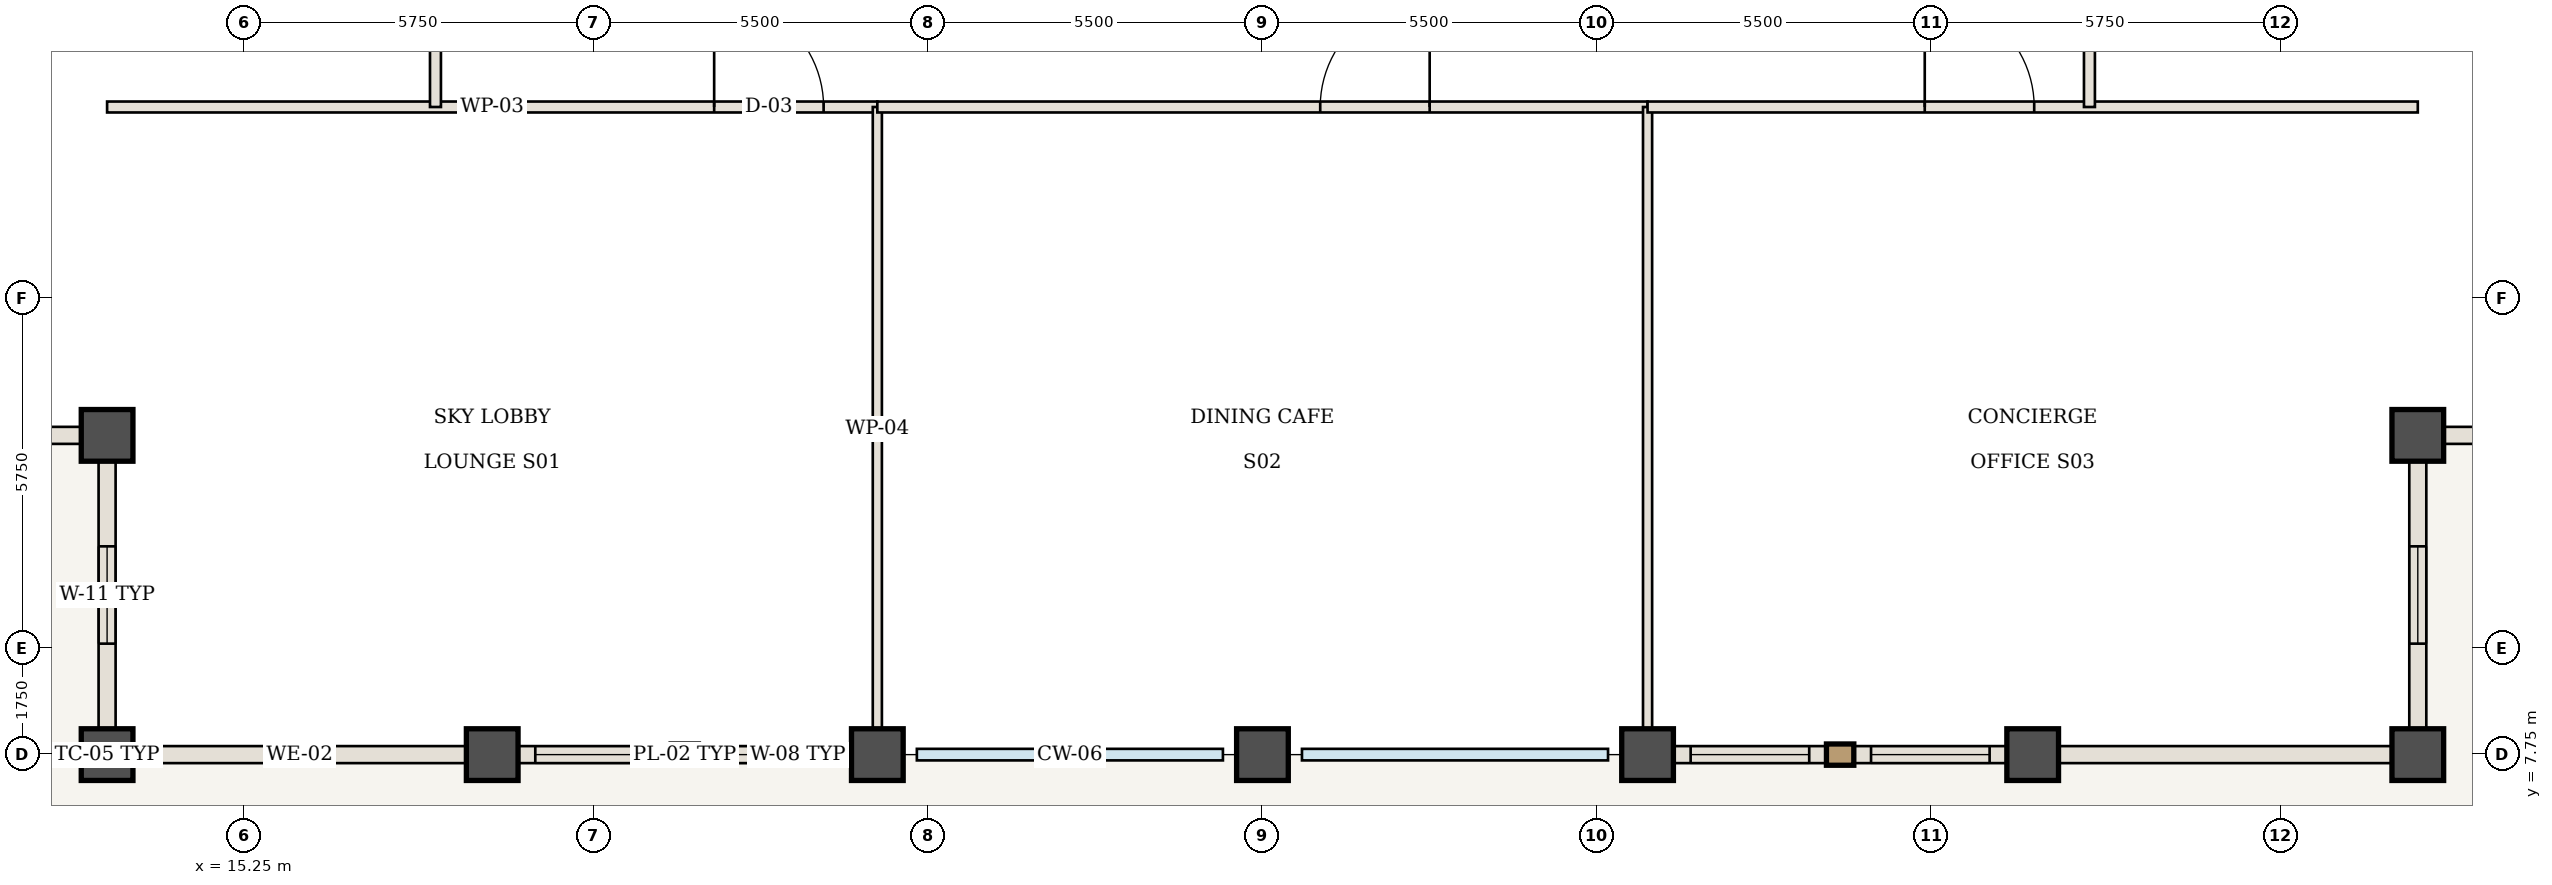
"""IFC4 building model, lengths in metres.
Left out: names, types, materials, properties, quantities, classifications, styles, units other than length and angle.
Written with IfcOpenShell. Run it as: python <this file> out.ifc"""

import sys

from ifc_helpers import new_model, si_unit, direction, frame, frame_2d, origin, origin_2d, place, context, subcontext, project, spatial, rectangle, extrude, element, fill, save


model = new_model("IFC4")
c1 = context("Model", 3, precision=1e-05, world=origin(), true_north=direction((0.0, 1.0)))
c2 = subcontext(c1, "Body", "Model", "MODEL_VIEW")
j1 = project(units=[si_unit("LENGTHUNIT", "METRE"), si_unit("PLANEANGLEUNIT", "RADIAN")], contexts=[c1])
p1 = place(None, origin())
s1 = spatial("IfcSite", under=j1, at=p1, CompositionType="ELEMENT")
p2 = place(p1, origin())
s2 = spatial("IfcBuilding", under=s1, at=p2, CompositionType="ELEMENT")
p3 = place(p2, frame((0.0, 0.0, 182.35)))
s3 = spatial("IfcBuildingStorey", under=s2, at=p3, CompositionType="ELEMENT", Elevation=182.35)
for number, where, z_axis, x_axis in (
    (1, (13.0, 7.75, -0.42), (0.0, 0.0, 1.0), (1.0, 0.0, 0.0)),
    (2, (13.0, 13.0, -0.42), (0.0, 0.0, 1.0), (1.0, 0.0, 0.0)),
    (3, (51.0, 7.75, -0.42), (0.0, 0.0, 1.0), (1.0, 0.0, 0.0)),
    (4, (51.0, 13.0, -0.42), (0.0, 0.0, 1.0), (1.0, 0.0, 0.0)),
    (5, (19.333, 7.75, -0.42), (0.0, 0.0, 1.0), (1.0, 0.0, 0.0)),
    (6, (25.667, 7.75, -0.42), (0.0, 0.0, 1.0), (1.0, 0.0, 0.0)),
    (7, (32.0, 7.75, -0.42), (0.0, 0.0, 1.0), (1.0, 0.0, 0.0)),
    (8, (38.333, 7.75, -0.42), (0.0, 0.0, 1.0), (1.0, 0.0, 0.0)),
    (9, (44.667, 7.75, -0.42), (0.0, 0.0, 1.0), (1.0, 0.0, 0.0)),
):
    element("IfcColumn", number, at=place(p3, frame(where, z_axis=z_axis, x_axis=x_axis)), inside=s3, PredefinedType="COLUMN", context=c2, shape_type="SweptSolid", body=[
        extrude(rectangle(XDim=0.85, YDim=0.85, at=origin_2d()), origin(), (0.0, 0.0, 1.0), 4.97),
    ])
p4 = place(p3, frame((13.0, 18.4, 0.0), z_axis=(0.0, 0.0, 1.0), x_axis=(1.0, 0.0, 0.0)))
e10 = element("IfcWall", 10, at=p4, inside=s3, PredefinedType="STANDARD", context=c2, shape_type="SweptSolid", body=[
    extrude(rectangle(XDim=12.667, YDim=0.18, at=frame_2d((6.333, 0.0))), origin(), (0.0, 0.0, 1.0), 4.13),
])
p5 = place(p4, frame((9.983, 0.0, 0.0)))
e11 = element("IfcOpeningElement", 11, at=p5, cuts=e10, PredefinedType="OPENING", context=c2, shape_type="SweptSolid", body=[
    extrude(rectangle(XDim=1.8, YDim=2.35, at=frame_2d((0.9, 1.175))), frame((0.0, 0.1, 0.0), z_axis=(0.0, -1.0, 0.0), x_axis=(1.0, 0.0, 0.0)), (0.0, 0.0, 1.0), 0.2),
])
p6 = place(p3, frame((25.667, 7.81, 0.0), z_axis=(0.0, 0.0, 1.0), x_axis=(0.0, 1.0, 0.0)))
e12 = element("IfcWall", 12, at=p6, inside=s3, PredefinedType="STANDARD", context=c2, shape_type="SweptSolid", body=[
    extrude(rectangle(XDim=10.59, YDim=0.15, at=frame_2d((5.295, 0.0))), origin(), (0.0, 0.0, 1.0), 4.13),
])
p7 = place(p3, frame((25.667, 18.4, 0.0), z_axis=(0.0, 0.0, 1.0), x_axis=(1.0, 0.0, 0.0)))
e13 = element("IfcWall", 13, at=p7, inside=s3, PredefinedType="STANDARD", context=c2, shape_type="SweptSolid", body=[
    extrude(rectangle(XDim=12.667, YDim=0.18, at=frame_2d((6.333, 0.0))), origin(), (0.0, 0.0, 1.0), 4.13),
])
p8 = place(p7, frame((7.283, 0.0, 0.0)))
e14 = element("IfcOpeningElement", 14, at=p8, cuts=e13, PredefinedType="OPENING", context=c2, shape_type="SweptSolid", body=[
    extrude(rectangle(XDim=1.8, YDim=2.35, at=frame_2d((0.9, 1.175))), frame((0.0, 0.1, 0.0), z_axis=(0.0, -1.0, 0.0), x_axis=(1.0, 0.0, 0.0)), (0.0, 0.0, 1.0), 0.2),
])
p9 = place(p3, frame((38.333, 7.81, 0.0), z_axis=(0.0, 0.0, 1.0), x_axis=(0.0, 1.0, 0.0)))
e15 = element("IfcWall", 15, at=p9, inside=s3, PredefinedType="STANDARD", context=c2, shape_type="SweptSolid", body=[
    extrude(rectangle(XDim=10.59, YDim=0.15, at=frame_2d((5.295, 0.0))), origin(), (0.0, 0.0, 1.0), 4.13),
])
p10 = place(p3, frame((38.333, 18.4, 0.0), z_axis=(0.0, 0.0, 1.0), x_axis=(1.0, 0.0, 0.0)))
e16 = element("IfcWall", 16, at=p10, inside=s3, PredefinedType="STANDARD", context=c2, shape_type="SweptSolid", body=[
    extrude(rectangle(XDim=12.667, YDim=0.18, at=frame_2d((6.333, 0.0))), origin(), (0.0, 0.0, 1.0), 4.13),
])
p11 = place(p10, frame((4.558, 0.0, 0.0)))
e17 = element("IfcOpeningElement", 17, at=p11, cuts=e16, PredefinedType="OPENING", context=c2, shape_type="SweptSolid", body=[
    extrude(rectangle(XDim=1.8, YDim=2.35, at=frame_2d((0.9, 1.175))), frame((0.0, 0.1, 0.0), z_axis=(0.0, -1.0, 0.0), x_axis=(1.0, 0.0, 0.0)), (0.0, 0.0, 1.0), 0.2),
])
p12 = place(p3, frame((18.4, 18.4, 0.0), z_axis=(0.0, 0.0, 1.0), x_axis=(0.0, 1.0, 0.0)))
e18 = element("IfcWall", 18, at=p12, inside=s3, PredefinedType="STANDARD", context=c2, shape_type="SweptSolid", body=[
    extrude(rectangle(XDim=19.933, YDim=0.18, at=frame_2d((9.967, 0.0))), origin(), (0.0, 0.0, 1.0), 4.13),
])
p13 = place(p12, frame((9.467, 0.0, 0.0)))
e19 = element("IfcOpeningElement", 19, at=p13, cuts=e18, PredefinedType="OPENING", context=c2, shape_type="SweptSolid", body=[
    extrude(rectangle(XDim=1.8, YDim=2.35, at=frame_2d((0.9, 1.175))), frame((0.0, 0.1, 0.0), z_axis=(0.0, -1.0, 0.0), x_axis=(1.0, 0.0, 0.0)), (0.0, 0.0, 1.0), 0.2),
])
p14 = place(p3, frame((45.6, 18.4, 0.0), z_axis=(0.0, 0.0, 1.0), x_axis=(0.0, 1.0, 0.0)))
e20 = element("IfcWall", 20, at=p14, inside=s3, PredefinedType="STANDARD", context=c2, shape_type="SweptSolid", body=[
    extrude(rectangle(XDim=13.4, YDim=0.18, at=frame_2d((6.7, 0.0))), origin(), (0.0, 0.0, 1.0), 4.13),
])
p15 = place(p14, frame((6.2, 0.0, 0.0)))
e21 = element("IfcOpeningElement", 21, at=p15, cuts=e20, PredefinedType="OPENING", context=c2, shape_type="SweptSolid", body=[
    extrude(rectangle(XDim=0.98, YDim=2.2, at=frame_2d((0.49, 1.1))), frame((0.0, 0.1, 0.0), z_axis=(0.0, -1.0, 0.0), x_axis=(1.0, 0.0, 0.0)), (0.0, 0.0, 1.0), 0.2),
])
p16 = place(p3, frame((19.333, 7.75, 0.0), z_axis=(0.0, 0.0, 1.0), x_axis=(-1.0, 0.0, 0.0)))
e22 = element("IfcWall", 22, at=p16, inside=s3, PredefinedType="USERDEFINED", context=c2, shape_type="SweptSolid", body=[
    extrude(rectangle(XDim=6.333, YDim=0.28, at=frame_2d((3.167, 0.0))), origin(), (0.0, 0.0, 1.0), 3.43),
])
p17 = place(p3, frame((25.667, 7.75, 0.0), z_axis=(0.0, 0.0, 1.0), x_axis=(-1.0, 0.0, 0.0)))
e23 = element("IfcWall", 23, at=p17, inside=s3, PredefinedType="USERDEFINED", context=c2, shape_type="SweptSolid", body=[
    extrude(rectangle(XDim=6.333, YDim=0.28, at=frame_2d((3.167, 0.0))), origin(), (0.0, 0.0, 1.0), 3.43),
])
p18 = place(p17, frame((0.708, 0.0, 0.85)))
e24 = element("IfcOpeningElement", 24, at=p18, cuts=e23, PredefinedType="OPENING", context=c2, shape_type="SweptSolid", body=[
    extrude(rectangle(XDim=1.95, YDim=2.2, at=frame_2d((0.975, 1.1))), frame((0.0, 0.15, 0.0), z_axis=(0.0, -1.0, 0.0), x_axis=(1.0, 0.0, 0.0)), (0.0, 0.0, 1.0), 0.3),
])
p19 = place(p17, frame((3.675, 0.0, 0.85)))
e25 = element("IfcOpeningElement", 25, at=p19, cuts=e23, PredefinedType="OPENING", context=c2, shape_type="SweptSolid", body=[
    extrude(rectangle(XDim=1.95, YDim=2.2, at=frame_2d((0.975, 1.1))), frame((0.0, 0.15, 0.0), z_axis=(0.0, -1.0, 0.0), x_axis=(1.0, 0.0, 0.0)), (0.0, 0.0, 1.0), 0.3),
])
p20 = place(p3, frame((44.667, 7.75, 0.0), z_axis=(0.0, 0.0, 1.0), x_axis=(-1.0, 0.0, 0.0)))
e26 = element("IfcWall", 26, at=p20, inside=s3, PredefinedType="USERDEFINED", context=c2, shape_type="SweptSolid", body=[
    extrude(rectangle(XDim=6.333, YDim=0.28, at=frame_2d((3.167, 0.0))), origin(), (0.0, 0.0, 1.0), 3.43),
])
p21 = place(p20, frame((0.708, 0.0, 0.85)))
e27 = element("IfcOpeningElement", 27, at=p21, cuts=e26, PredefinedType="OPENING", context=c2, shape_type="SweptSolid", body=[
    extrude(rectangle(XDim=1.95, YDim=2.2, at=frame_2d((0.975, 1.1))), frame((0.0, 0.15, 0.0), z_axis=(0.0, -1.0, 0.0), x_axis=(1.0, 0.0, 0.0)), (0.0, 0.0, 1.0), 0.3),
])
p22 = place(p20, frame((3.675, 0.0, 0.85)))
e28 = element("IfcOpeningElement", 28, at=p22, cuts=e26, PredefinedType="OPENING", context=c2, shape_type="SweptSolid", body=[
    extrude(rectangle(XDim=1.95, YDim=2.2, at=frame_2d((0.975, 1.1))), frame((0.0, 0.15, 0.0), z_axis=(0.0, -1.0, 0.0), x_axis=(1.0, 0.0, 0.0)), (0.0, 0.0, 1.0), 0.3),
])
p23 = place(p3, frame((51.0, 7.75, 0.0), z_axis=(0.0, 0.0, 1.0), x_axis=(-1.0, 0.0, 0.0)))
e29 = element("IfcWall", 29, at=p23, inside=s3, PredefinedType="USERDEFINED", context=c2, shape_type="SweptSolid", body=[
    extrude(rectangle(XDim=6.333, YDim=0.28, at=frame_2d((3.167, 0.0))), origin(), (0.0, 0.0, 1.0), 3.43),
])
p24 = place(p3, frame((13.0, 7.75, 0.0), z_axis=(0.0, 0.0, 1.0), x_axis=(0.0, 1.0, 0.0)))
e30 = element("IfcWall", 30, at=p24, inside=s3, PredefinedType="USERDEFINED", context=c2, shape_type="SweptSolid", body=[
    extrude(rectangle(XDim=5.25, YDim=0.28, at=frame_2d((2.625, 0.0))), origin(), (0.0, 0.0, 1.0), 3.43),
])
p25 = place(p24, frame((1.825, 0.0, 0.85)))
e31 = element("IfcOpeningElement", 31, at=p25, cuts=e30, PredefinedType="OPENING", context=c2, shape_type="SweptSolid", body=[
    extrude(rectangle(XDim=1.6, YDim=2.05, at=frame_2d((0.8, 1.025))), frame((0.0, 0.15, 0.0), z_axis=(0.0, -1.0, 0.0), x_axis=(1.0, 0.0, 0.0)), (0.0, 0.0, 1.0), 0.3),
])
p26 = place(p3, frame((13.0, 13.0, 0.0), z_axis=(0.0, 0.0, 1.0), x_axis=(-1.0, 0.0, 0.0)))
e32 = element("IfcWall", 32, at=p26, inside=s3, PredefinedType="USERDEFINED", context=c2, shape_type="SweptSolid", body=[
    extrude(rectangle(XDim=5.25, YDim=0.28, at=frame_2d((2.625, 0.0))), origin(), (0.0, 0.0, 1.0), 3.43),
])
p27 = place(p26, frame((1.825, 0.0, 0.85)))
e33 = element("IfcOpeningElement", 33, at=p27, cuts=e32, PredefinedType="OPENING", context=c2, shape_type="SweptSolid", body=[
    extrude(rectangle(XDim=1.6, YDim=2.05, at=frame_2d((0.8, 1.025))), frame((0.0, 0.15, 0.0), z_axis=(0.0, -1.0, 0.0), x_axis=(1.0, 0.0, 0.0)), (0.0, 0.0, 1.0), 0.3),
])
p28 = place(p3, frame((51.0, 13.0, 0.0), z_axis=(0.0, 0.0, 1.0), x_axis=(0.0, -1.0, 0.0)))
e34 = element("IfcWall", 34, at=p28, inside=s3, PredefinedType="USERDEFINED", context=c2, shape_type="SweptSolid", body=[
    extrude(rectangle(XDim=5.25, YDim=0.28, at=frame_2d((2.625, 0.0))), origin(), (0.0, 0.0, 1.0), 3.43),
])
p29 = place(p28, frame((1.825, 0.0, 0.85)))
e35 = element("IfcOpeningElement", 35, at=p29, cuts=e34, PredefinedType="OPENING", context=c2, shape_type="SweptSolid", body=[
    extrude(rectangle(XDim=1.6, YDim=2.05, at=frame_2d((0.8, 1.025))), frame((0.0, 0.15, 0.0), z_axis=(0.0, -1.0, 0.0), x_axis=(1.0, 0.0, 0.0)), (0.0, 0.0, 1.0), 0.3),
])
p30 = place(p3, frame((56.25, 13.0, 0.0), z_axis=(0.0, 0.0, 1.0), x_axis=(-1.0, 0.0, 0.0)))
e36 = element("IfcWall", 36, at=p30, inside=s3, PredefinedType="USERDEFINED", context=c2, shape_type="SweptSolid", body=[
    extrude(rectangle(XDim=5.25, YDim=0.28, at=frame_2d((2.625, 0.0))), origin(), (0.0, 0.0, 1.0), 3.43),
])
p31 = place(p30, frame((1.825, 0.0, 0.85)))
e37 = element("IfcOpeningElement", 37, at=p31, cuts=e36, PredefinedType="OPENING", context=c2, shape_type="SweptSolid", body=[
    extrude(rectangle(XDim=1.6, YDim=2.05, at=frame_2d((0.8, 1.025))), frame((0.0, 0.15, 0.0), z_axis=(0.0, -1.0, 0.0), x_axis=(1.0, 0.0, 0.0)), (0.0, 0.0, 1.0), 0.3),
])
p32 = place(p5, origin())
e38 = element("IfcDoor", 38, at=p32, inside=s3, OperationType="SINGLE_SWING_LEFT", PredefinedType="DOOR", context=c2, shape_type="SweptSolid", body=[
    extrude(rectangle(XDim=1.8, YDim=2.35, at=frame_2d((0.9, 1.175))), frame((0.0, 0.025, 0.0), z_axis=(0.0, -1.0, 0.0), x_axis=(1.0, 0.0, 0.0)), (0.0, 0.0, 1.0), 0.05),
])
fill(e11, e38)
p33 = place(p8, origin())
e39 = element("IfcDoor", 39, at=p33, inside=s3, OperationType="SINGLE_SWING_RIGHT", PredefinedType="DOOR", context=c2, shape_type="SweptSolid", body=[
    extrude(rectangle(XDim=1.8, YDim=2.35, at=frame_2d((0.9, 1.175))), frame((0.0, 0.025, 0.0), z_axis=(0.0, -1.0, 0.0), x_axis=(1.0, 0.0, 0.0)), (0.0, 0.0, 1.0), 0.05),
])
fill(e14, e39)
p34 = place(p11, origin())
e40 = element("IfcDoor", 40, at=p34, inside=s3, OperationType="SINGLE_SWING_LEFT", PredefinedType="DOOR", context=c2, shape_type="SweptSolid", body=[
    extrude(rectangle(XDim=1.8, YDim=2.35, at=frame_2d((0.9, 1.175))), frame((0.0, 0.025, 0.0), z_axis=(0.0, -1.0, 0.0), x_axis=(1.0, 0.0, 0.0)), (0.0, 0.0, 1.0), 0.05),
])
fill(e17, e40)
p35 = place(p18, origin())
e41 = element("IfcWindow", 41, at=p35, inside=s3, PartitioningType="SINGLE_PANEL", PredefinedType="WINDOW", context=c2, shape_type="SweptSolid", body=[
    extrude(rectangle(XDim=1.95, YDim=2.2, at=frame_2d((0.975, 1.1))), frame((0.0, 0.03, 0.0), z_axis=(0.0, -1.0, 0.0), x_axis=(1.0, 0.0, 0.0)), (0.0, 0.0, 1.0), 0.06),
])
fill(e24, e41)
p36 = place(p19, origin())
e42 = element("IfcWindow", 42, at=p36, inside=s3, PartitioningType="SINGLE_PANEL", PredefinedType="WINDOW", context=c2, shape_type="SweptSolid", body=[
    extrude(rectangle(XDim=1.95, YDim=2.2, at=frame_2d((0.975, 1.1))), frame((0.0, 0.03, 0.0), z_axis=(0.0, -1.0, 0.0), x_axis=(1.0, 0.0, 0.0)), (0.0, 0.0, 1.0), 0.06),
])
fill(e25, e42)
p37 = place(p21, origin())
e43 = element("IfcWindow", 43, at=p37, inside=s3, PartitioningType="SINGLE_PANEL", PredefinedType="WINDOW", context=c2, shape_type="SweptSolid", body=[
    extrude(rectangle(XDim=1.95, YDim=2.2, at=frame_2d((0.975, 1.1))), frame((0.0, 0.03, 0.0), z_axis=(0.0, -1.0, 0.0), x_axis=(1.0, 0.0, 0.0)), (0.0, 0.0, 1.0), 0.06),
])
fill(e27, e43)
p38 = place(p22, origin())
e44 = element("IfcWindow", 44, at=p38, inside=s3, PartitioningType="SINGLE_PANEL", PredefinedType="WINDOW", context=c2, shape_type="SweptSolid", body=[
    extrude(rectangle(XDim=1.95, YDim=2.2, at=frame_2d((0.975, 1.1))), frame((0.0, 0.03, 0.0), z_axis=(0.0, -1.0, 0.0), x_axis=(1.0, 0.0, 0.0)), (0.0, 0.0, 1.0), 0.06),
])
fill(e28, e44)
p39 = place(p25, origin())
e45 = element("IfcWindow", 45, at=p39, inside=s3, PartitioningType="SINGLE_PANEL", PredefinedType="WINDOW", context=c2, shape_type="SweptSolid", body=[
    extrude(rectangle(XDim=1.6, YDim=2.05, at=frame_2d((0.8, 1.025))), frame((0.0, 0.03, 0.0), z_axis=(0.0, -1.0, 0.0), x_axis=(1.0, 0.0, 0.0)), (0.0, 0.0, 1.0), 0.06),
])
fill(e31, e45)
p40 = place(p29, origin())
e46 = element("IfcWindow", 46, at=p40, inside=s3, PartitioningType="SINGLE_PANEL", PredefinedType="WINDOW", context=c2, shape_type="SweptSolid", body=[
    extrude(rectangle(XDim=1.6, YDim=2.05, at=frame_2d((0.8, 1.025))), frame((0.0, 0.03, 0.0), z_axis=(0.0, -1.0, 0.0), x_axis=(1.0, 0.0, 0.0)), (0.0, 0.0, 1.0), 0.06),
])
fill(e35, e46)
save(model, sys.argv[1])
